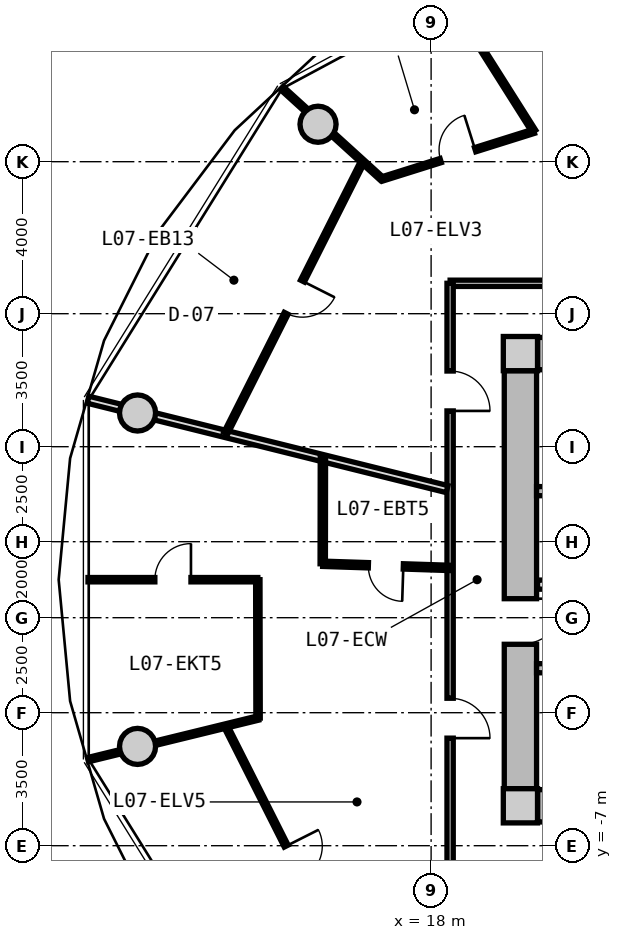
"""IFC4 building model, lengths in metres.
Left out: names, types, materials, properties, quantities, classifications, styles, units other than length and angle.
Written with IfcOpenShell. Run it as: python <this file> out.ifc"""

import sys

from ifc_helpers import new_model, si_unit, direction, frame, frame_2d, origin, origin_2d, place, context, subcontext, project, spatial, rectangle, circle, extrude, source, transform, mapped, element, fill, save


model = new_model("IFC4")
c1 = context("Model", 3, precision=1e-05, world=origin(), true_north=direction((0.0, 1.0)))
c2 = subcontext(c1, "Body", "Model", "MODEL_VIEW")
j1 = project(units=[si_unit("LENGTHUNIT", "METRE"), si_unit("PLANEANGLEUNIT", "RADIAN")], contexts=[c1])
p1 = place(None, origin())
s1 = spatial("IfcSite", under=j1, at=p1, CompositionType="ELEMENT")
p2 = place(p1, origin())
s2 = spatial("IfcBuilding", under=s1, at=p2, CompositionType="ELEMENT")
p3 = place(p2, frame((0.0, 0.0, 27.7)))
s3 = spatial("IfcBuildingStorey", under=s2, at=p3, CompositionType="ELEMENT", Elevation=27.7)
m1 = source(origin(), c2, "Body", "SweptSolid", [
    extrude(rectangle(XDim=0.9, YDim=0.9, at=origin_2d()), origin(), (0.0, 0.0, 1.0), 3.05),
])
for number, where, z_axis, x_axis in (
    (1, (20.35, -5.95, 0.0), (0.0, 0.0, 1.0), (1.0, 0.0, 0.0)),
    (2, (20.35, 5.95, 0.0), (0.0, 0.0, 1.0), (1.0, 0.0, 0.0)),
):
    element("IfcColumn", number, at=place(p3, frame(where, z_axis=z_axis, x_axis=x_axis)), inside=s3, PredefinedType="COLUMN", context=c2, shape_type="MappedRepresentation", body=[
        mapped(m1, transform((0.0, 0.0, 0.0), x_axis=(1.0, 0.0, 0.0), y_axis=(0.0, 1.0, 0.0), z_axis=(0.0, 0.0, 1.0), scale=1.0)),
    ])
m2 = source(origin(), c2, "Body", "SweptSolid", [
    extrude(rectangle(XDim=14.4, YDim=0.85, at=frame_2d((7.2, 0.0))), origin(), (0.0, 0.0, 1.0), 2.79),
])
for number, where, z_axis, x_axis in (
    (3, (20.8, 5.95, 0.0), (0.0, 0.0, 1.0), (1.0, 0.0, 0.0)),
    (4, (35.2, -5.95, 0.0), (0.0, 0.0, 1.0), (-1.0, 0.0, 0.0)),
):
    element("IfcWall", number, at=place(p3, frame(where, z_axis=z_axis, x_axis=x_axis)), inside=s3, PredefinedType="SHEAR", context=c2, shape_type="MappedRepresentation", body=[
        mapped(m2, transform((0.0, 0.0, 0.0), x_axis=(1.0, 0.0, 0.0), y_axis=(0.0, 1.0, 0.0), z_axis=(0.0, 0.0, 1.0), scale=1.0)),
    ])
m3 = source(origin(), c2, "Body", "SweptSolid", [
    extrude(rectangle(XDim=11.0, YDim=0.85, at=frame_2d((5.5, 0.0))), origin(), (0.0, 0.0, 1.0), 2.79),
])
p4 = place(p3, frame((20.35, -5.5, 0.0), z_axis=(0.0, 0.0, 1.0), x_axis=(0.0, 1.0, 0.0)))
e5 = element("IfcWall", 5, at=p4, inside=s3, PredefinedType="SHEAR", context=c2, shape_type="MappedRepresentation", body=[
    mapped(m3, transform((0.0, 0.0, 0.0), x_axis=(1.0, 0.0, 0.0), y_axis=(0.0, 1.0, 0.0), z_axis=(0.0, 0.0, 1.0), scale=1.0)),
])
p5 = place(p4, frame((3.8, 0.0, 0.0)))
e6 = element("IfcOpeningElement", 6, at=p5, cuts=e5, PredefinedType="OPENING", context=c2, shape_type="SweptSolid", body=[
    extrude(rectangle(XDim=1.2, YDim=2.15, at=frame_2d((0.6, 1.075))), frame((0.0, 0.435, 0.0), z_axis=(0.0, -1.0, 0.0), x_axis=(1.0, 0.0, 0.0)), (0.0, 0.0, 1.0), 0.87),
])
m4 = source(origin(), c2, "Body", "SweptSolid", [
    extrude(circle(Radius=0.475, at=origin_2d()), origin(), (0.0, 0.0, 1.0), 3.05),
])
for number, where, z_axis, x_axis in (
    (7, (15.025, 11.985, 0.0), (0.0, 0.0, 1.0), (1.0, 0.0, 0.0)),
    (8, (10.275, 4.387, 0.0), (0.0, 0.0, 1.0), (1.0, 0.0, 0.0)),
    (9, (10.275, -4.387, 0.0), (0.0, 0.0, 1.0), (1.0, 0.0, 0.0)),
):
    element("IfcColumn", number, at=place(p3, frame(where, z_axis=z_axis, x_axis=x_axis)), inside=s3, PredefinedType="COLUMN", context=c2, shape_type="MappedRepresentation", body=[
        mapped(m4, transform((0.0, 0.0, 0.0), x_axis=(1.0, 0.0, 0.0), y_axis=(0.0, 1.0, 0.0), z_axis=(0.0, 0.0, 1.0), scale=1.0)),
    ])
m5 = source(origin(), c2, "Body", "SweptSolid", [
    extrude(rectangle(XDim=7.765, YDim=0.24, at=frame_2d((3.883, 0.0))), origin(), (0.0, 0.0, 1.0), 2.79),
])
p6 = place(p3, frame((20.775, 2.33, 0.0), z_axis=(0.0, 0.0, 1.0), x_axis=(1.0, 0.0, 0.0)))
e10 = element("IfcWall", 10, at=p6, inside=s3, PredefinedType="PARTITIONING", context=c2, shape_type="MappedRepresentation", body=[
    mapped(m5, transform((0.0, 0.0, 0.0), x_axis=(1.0, 0.0, 0.0), y_axis=(0.0, 1.0, 0.0), z_axis=(0.0, 0.0, 1.0), scale=1.0)),
])
p7 = place(p3, frame((20.775, -2.33, 0.0), z_axis=(0.0, 0.0, 1.0), x_axis=(1.0, 0.0, 0.0)))
e11 = element("IfcWall", 11, at=p7, inside=s3, PredefinedType="PARTITIONING", context=c2, shape_type="MappedRepresentation", body=[
    mapped(m5, transform((0.0, 0.0, 0.0), x_axis=(1.0, 0.0, 0.0), y_axis=(0.0, 1.0, 0.0), z_axis=(0.0, 0.0, 1.0), scale=1.0)),
])
p8 = place(p7, frame((0.885, 0.0, 0.0)))
e12 = element("IfcOpeningElement", 12, at=p8, cuts=e11, PredefinedType="OPENING", context=c2, shape_type="SweptSolid", body=[
    extrude(rectangle(XDim=1.1, YDim=2.15, at=frame_2d((0.55, 1.075))), frame((0.0, 0.13, 0.0), z_axis=(0.0, -1.0, 0.0), x_axis=(1.0, 0.0, 0.0)), (0.0, 0.0, 1.0), 0.26),
])
m6 = source(origin(), c2, "Body", "SweptSolid", [
    extrude(rectangle(XDim=7.62, YDim=0.24, at=frame_2d((3.81, 0.0))), origin(), (0.0, 0.0, 1.0), 2.775),
])
p9 = place(p3, frame((20.8, -0.13, 0.0), z_axis=(0.0, 0.0, 1.0), x_axis=(1.0, 0.0, 0.0)))
e13 = element("IfcWall", 13, at=p9, inside=s3, PredefinedType="PARTITIONING", context=c2, shape_type="MappedRepresentation", body=[
    mapped(m6, transform((0.0, 0.0, 0.0), x_axis=(1.0, 0.0, 0.0), y_axis=(0.0, 1.0, 0.0), z_axis=(0.0, 0.0, 1.0), scale=1.0)),
])
p10 = place(p9, frame((6.22, 0.0, 0.0)))
e14 = element("IfcOpeningElement", 14, at=p10, cuts=e13, PredefinedType="OPENING", context=c2, shape_type="SweptSolid", body=[
    extrude(rectangle(XDim=1.0, YDim=2.1, at=frame_2d((0.5, 1.05))), frame((0.0, 0.13, 0.0), z_axis=(0.0, -1.0, 0.0), x_axis=(1.0, 0.0, 0.0)), (0.0, 0.0, 1.0), 0.26),
])
p11 = place(p9, frame((0.85, 0.0, 0.0)))
e15 = element("IfcOpeningElement", 15, at=p11, cuts=e13, PredefinedType="OPENING", context=c2, shape_type="SweptSolid", body=[
    extrude(rectangle(XDim=1.1, YDim=2.2, at=frame_2d((0.55, 1.1))), frame((0.0, 0.13, 0.0), z_axis=(0.0, -1.0, 0.0), x_axis=(1.0, 0.0, 0.0)), (0.0, 0.0, 1.0), 0.26),
])
p12 = place(p9, frame((3.85, 0.0, 0.0)))
e16 = element("IfcOpeningElement", 16, at=p12, cuts=e13, PredefinedType="OPENING", context=c2, shape_type="SweptSolid", body=[
    extrude(rectangle(XDim=1.1, YDim=2.2, at=frame_2d((0.55, 1.1))), frame((0.0, 0.13, 0.0), z_axis=(0.0, -1.0, 0.0), x_axis=(1.0, 0.0, 0.0)), (0.0, 0.0, 1.0), 0.26),
])
m7 = source(origin(), c2, "Body", "SweptSolid", [
    extrude(rectangle(XDim=19.0, YDim=0.165, at=frame_2d((9.5, 0.0))), origin(), (0.0, 0.0, 1.0), 2.775),
])
p13 = place(p3, frame((18.5, 7.8, 0.0), z_axis=(0.0, 0.0, 1.0), x_axis=(1.0, 0.0, 0.0)))
e17 = element("IfcWall", 17, at=p13, inside=s3, PredefinedType="PARTITIONING", context=c2, shape_type="MappedRepresentation", body=[
    mapped(m7, transform((0.0, 0.0, 0.0), x_axis=(1.0, 0.0, 0.0), y_axis=(0.0, 1.0, 0.0), z_axis=(0.0, 0.0, 1.0), scale=1.0)),
])
p14 = place(p13, frame((10.448, 0.0, 0.0)))
e18 = element("IfcOpeningElement", 18, at=p14, cuts=e17, PredefinedType="OPENING", context=c2, shape_type="SweptSolid", body=[
    extrude(rectangle(XDim=1.05, YDim=2.15, at=frame_2d((0.525, 1.075))), frame((0.0, 0.093, 0.0), z_axis=(0.0, -1.0, 0.0), x_axis=(1.0, 0.0, 0.0)), (0.0, 0.0, 1.0), 0.185),
])
m8 = source(origin(), c2, "Body", "SweptSolid", [
    extrude(rectangle(XDim=15.6, YDim=0.165, at=frame_2d((7.8, 0.0))), origin(), (0.0, 0.0, 1.0), 2.775),
])
p15 = place(p3, frame((18.5, -7.8, 0.0), z_axis=(0.0, 0.0, 1.0), x_axis=(0.0, 1.0, 0.0)))
e19 = element("IfcWall", 19, at=p15, inside=s3, PredefinedType="PARTITIONING", context=c2, shape_type="MappedRepresentation", body=[
    mapped(m8, transform((0.0, 0.0, 0.0), x_axis=(1.0, 0.0, 0.0), y_axis=(0.0, 1.0, 0.0), z_axis=(0.0, 0.0, 1.0), scale=1.0)),
])
p16 = place(p15, frame((12.241, 0.0, 0.0)))
e20 = element("IfcOpeningElement", 20, at=p16, cuts=e19, PredefinedType="OPENING", context=c2, shape_type="SweptSolid", body=[
    extrude(rectangle(XDim=1.05, YDim=2.15, at=frame_2d((0.525, 1.075))), frame((0.0, 0.093, 0.0), z_axis=(0.0, -1.0, 0.0), x_axis=(1.0, 0.0, 0.0)), (0.0, 0.0, 1.0), 0.185),
])
p17 = place(p15, frame((3.63, 0.0, 0.0)))
e21 = element("IfcOpeningElement", 21, at=p17, cuts=e19, PredefinedType="OPENING", context=c2, shape_type="SweptSolid", body=[
    extrude(rectangle(XDim=1.05, YDim=2.15, at=frame_2d((0.525, 1.075))), frame((0.0, 0.093, 0.0), z_axis=(0.0, -1.0, 0.0), x_axis=(1.0, 0.0, 0.0)), (0.0, 0.0, 1.0), 0.185),
])
m9 = source(origin(), c2, "Body", "SweptSolid", [
    extrude(rectangle(XDim=9.737, YDim=0.19, at=frame_2d((4.869, 0.0))), origin(), (0.0, 0.0, 1.0), 2.225),
])
p18 = place(p3, frame((18.42, 2.385, 0.0), z_axis=(0.0, 0.0, 1.0), x_axis=(-0.970392716238, 0.241532557375, 0.0)))
e22 = element("IfcWall", 22, at=p18, inside=s3, PredefinedType="PARTITIONING", context=c2, shape_type="MappedRepresentation", body=[
    mapped(m9, transform((0.0, 0.0, 0.0), x_axis=(1.0, 0.0, 0.0), y_axis=(0.0, 1.0, 0.0), z_axis=(0.0, 0.0, 1.0), scale=1.0)),
])
m10 = source(origin(), c2, "Body", "SweptSolid", [
    extrude(rectangle(XDim=8.018, YDim=0.115, at=frame_2d((4.009, 0.0))), origin(), (0.0, 0.0, 1.0), 2.775),
])
p19 = place(p3, frame((16.205, 11.014, 0.0), z_axis=(0.0, 0.0, 1.0), x_axis=(-0.450134355233, -0.89296084026, 0.0)))
e23 = element("IfcWall", 23, at=p19, inside=s3, PredefinedType="PARTITIONING", context=c2, shape_type="MappedRepresentation", body=[
    mapped(m10, transform((0.0, 0.0, 0.0), x_axis=(1.0, 0.0, 0.0), y_axis=(0.0, 1.0, 0.0), z_axis=(0.0, 0.0, 1.0), scale=1.0)),
])
p20 = place(p19, frame((3.534, 0.0, 0.0)))
e24 = element("IfcOpeningElement", 24, at=p20, cuts=e23, PredefinedType="OPENING", context=c2, shape_type="SweptSolid", body=[
    extrude(rectangle(XDim=0.95, YDim=2.1, at=frame_2d((0.475, 1.05))), frame((0.0, 0.067, 0.0), z_axis=(0.0, -1.0, 0.0), x_axis=(1.0, 0.0, 0.0)), (0.0, 0.0, 1.0), 0.135),
])
m11 = source(origin(), c2, "Body", "SweptSolid", [
    extrude(rectangle(XDim=3.551, YDim=0.115, at=frame_2d((1.775, 0.0))), origin(), (0.0, 0.0, 1.0), 2.225),
])
p21 = place(p3, frame((16.698, 10.553, 0.0), z_axis=(0.0, 0.0, 1.0), x_axis=(-0.740291560769, 0.672285954824, 0.0)))
e25 = element("IfcWall", 25, at=p21, inside=s3, PredefinedType="PARTITIONING", context=c2, shape_type="MappedRepresentation", body=[
    mapped(m11, transform((0.0, 0.0, 0.0), x_axis=(1.0, 0.0, 0.0), y_axis=(0.0, 1.0, 0.0), z_axis=(0.0, 0.0, 1.0), scale=1.0)),
])
m12 = source(origin(), c2, "Body", "SweptSolid", [
    extrude(rectangle(XDim=4.15, YDim=0.115, at=frame_2d((2.075, 0.0))), origin(), (0.0, 0.0, 1.0), 2.775),
])
p22 = place(p3, frame((20.704, 11.801, 0.0), z_axis=(0.0, 0.0, 1.0), x_axis=(-0.534475378192, 0.845184045109, 0.0)))
e26 = element("IfcWall", 26, at=p22, inside=s3, PredefinedType="PARTITIONING", context=c2, shape_type="MappedRepresentation", body=[
    mapped(m12, transform((0.0, 0.0, 0.0), x_axis=(1.0, 0.0, 0.0), y_axis=(0.0, 1.0, 0.0), z_axis=(0.0, 0.0, 1.0), scale=1.0)),
])
m13 = source(origin(), c2, "Body", "SweptSolid", [
    extrude(rectangle(XDim=4.189, YDim=0.115, at=frame_2d((2.094, 0.0))), origin(), (0.0, 0.0, 1.0), 2.775),
])
p23 = place(p3, frame((20.704, 11.801, 0.0), z_axis=(0.0, 0.0, 1.0), x_axis=(-0.954002766053, -0.299797802467, 0.0)))
e27 = element("IfcWall", 27, at=p23, inside=s3, PredefinedType="PARTITIONING", context=c2, shape_type="MappedRepresentation", body=[
    mapped(m13, transform((0.0, 0.0, 0.0), x_axis=(1.0, 0.0, 0.0), y_axis=(0.0, 1.0, 0.0), z_axis=(0.0, 0.0, 1.0), scale=1.0)),
])
p24 = place(p23, frame((1.619, 0.0, 0.0)))
e28 = element("IfcOpeningElement", 28, at=p24, cuts=e27, PredefinedType="OPENING", context=c2, shape_type="SweptSolid", body=[
    extrude(rectangle(XDim=0.95, YDim=2.1, at=frame_2d((0.475, 1.05))), frame((0.0, 0.067, 0.0), z_axis=(0.0, -1.0, 0.0), x_axis=(1.0, 0.0, 0.0)), (0.0, 0.0, 1.0), 0.135),
])
p25 = place(p3, frame((12.596, -3.854, 0.0), z_axis=(0.0, 0.0, 1.0), x_axis=(0.450134355233, -0.89296084026, 0.0)))
e29 = element("IfcWall", 29, at=p25, inside=s3, PredefinedType="PARTITIONING", context=c2, shape_type="MappedRepresentation", body=[
    mapped(m10, transform((0.0, 0.0, 0.0), x_axis=(1.0, 0.0, 0.0), y_axis=(0.0, 1.0, 0.0), z_axis=(0.0, 0.0, 1.0), scale=1.0)),
])
p26 = place(p25, frame((3.534, 0.0, 0.0)))
e30 = element("IfcOpeningElement", 30, at=p26, cuts=e29, PredefinedType="OPENING", context=c2, shape_type="SweptSolid", body=[
    extrude(rectangle(XDim=0.95, YDim=2.1, at=frame_2d((0.475, 1.05))), frame((0.0, 0.067, 0.0), z_axis=(0.0, -1.0, 0.0), x_axis=(1.0, 0.0, 0.0)), (0.0, 0.0, 1.0), 0.135),
])
m14 = source(origin(), c2, "Body", "SweptSolid", [
    extrude(rectangle(XDim=4.609, YDim=0.115, at=frame_2d((2.305, 0.0))), origin(), (0.0, 0.0, 1.0), 2.225),
])
p27 = place(p3, frame((13.448, -3.641, 0.0), z_axis=(0.0, 0.0, 1.0), x_axis=(-0.971345494518, -0.237671896276, 0.0)))
e31 = element("IfcWall", 31, at=p27, inside=s3, PredefinedType="PARTITIONING", context=c2, shape_type="MappedRepresentation", body=[
    mapped(m14, transform((0.0, 0.0, 0.0), x_axis=(1.0, 0.0, 0.0), y_axis=(0.0, 1.0, 0.0), z_axis=(0.0, 0.0, 1.0), scale=1.0)),
])
m15 = source(origin(), c2, "Body", "SweptSolid", [
    extrude(rectangle(XDim=3.323, YDim=0.14, at=frame_2d((1.662, 0.0))), origin(), (0.0, 0.0, 1.0), 2.775),
])
p28 = place(p3, frame((18.47, 0.311, 0.0), z_axis=(0.0, 0.0, 1.0), x_axis=(-0.999467979553, 0.032615300817, 0.0)))
e32 = element("IfcWall", 32, at=p28, inside=s3, PredefinedType="PARTITIONING", context=c2, shape_type="MappedRepresentation", body=[
    mapped(m15, transform((0.0, 0.0, 0.0), x_axis=(1.0, 0.0, 0.0), y_axis=(0.0, 1.0, 0.0), z_axis=(0.0, 0.0, 1.0), scale=1.0)),
])
p29 = place(p28, frame((1.202, 0.0, 0.0)))
e33 = element("IfcOpeningElement", 33, at=p29, cuts=e32, PredefinedType="OPENING", context=c2, shape_type="SweptSolid", body=[
    extrude(rectangle(XDim=0.92, YDim=2.1, at=frame_2d((0.46, 1.05))), frame((0.0, 0.08, 0.0), z_axis=(0.0, -1.0, 0.0), x_axis=(1.0, 0.0, 0.0)), (0.0, 0.0, 1.0), 0.16),
])
m16 = source(origin(), c2, "Body", "SweptSolid", [
    extrude(rectangle(XDim=2.795, YDim=0.14, at=frame_2d((1.397, 0.0))), origin(), (0.0, 0.0, 1.0), 2.775),
])
p30 = place(p3, frame((15.148, 0.419, 0.0), z_axis=(0.0, 0.0, 1.0), x_axis=(0.001659531299, 0.999998622977, 0.0)))
e34 = element("IfcWall", 34, at=p30, inside=s3, PredefinedType="PARTITIONING", context=c2, shape_type="MappedRepresentation", body=[
    mapped(m16, transform((0.0, 0.0, 0.0), x_axis=(1.0, 0.0, 0.0), y_axis=(0.0, 1.0, 0.0), z_axis=(0.0, 0.0, 1.0), scale=1.0)),
])
m17 = source(origin(), c2, "Body", "SweptSolid", [
    extrude(rectangle(XDim=4.469, YDim=0.115, at=frame_2d((2.234, 0.0))), origin(), (0.0, 0.0, 1.0), 2.775),
])
p31 = place(p3, frame((13.44, 0.0, 0.0), z_axis=(0.0, 0.0, 1.0), x_axis=(-1.0, 0.0, 0.0)))
e35 = element("IfcWall", 35, at=p31, inside=s3, PredefinedType="PARTITIONING", context=c2, shape_type="MappedRepresentation", body=[
    mapped(m17, transform((0.0, 0.0, 0.0), x_axis=(1.0, 0.0, 0.0), y_axis=(0.0, 1.0, 0.0), z_axis=(0.0, 0.0, 1.0), scale=1.0)),
])
p32 = place(p31, frame((1.759, 0.0, 0.0)))
e36 = element("IfcOpeningElement", 36, at=p32, cuts=e35, PredefinedType="OPENING", context=c2, shape_type="SweptSolid", body=[
    extrude(rectangle(XDim=0.95, YDim=2.1, at=frame_2d((0.475, 1.05))), frame((0.0, 0.067, 0.0), z_axis=(0.0, -1.0, 0.0), x_axis=(1.0, 0.0, 0.0)), (0.0, 0.0, 1.0), 0.135),
])
m18 = source(origin(), c2, "Body", "SweptSolid", [
    extrude(rectangle(XDim=3.641, YDim=0.115, at=frame_2d((1.821, 0.0))), origin(), (0.0, 0.0, 1.0), 2.775),
])
p33 = place(p3, frame((13.44, 0.0, 0.0), z_axis=(0.0, 0.0, 1.0), x_axis=(0.001877301419, -0.999998237868, 0.0)))
e37 = element("IfcWall", 37, at=p33, inside=s3, PredefinedType="PARTITIONING", context=c2, shape_type="MappedRepresentation", body=[
    mapped(m18, transform((0.0, 0.0, 0.0), x_axis=(1.0, 0.0, 0.0), y_axis=(0.0, 1.0, 0.0), z_axis=(0.0, 0.0, 1.0), scale=1.0)),
])
m19 = source(origin(), c2, "Body", "SweptSolid", [
    extrude(rectangle(XDim=1.2, YDim=2.15, at=frame_2d((0.6, 1.075))), frame((0.0, 0.025, 0.0), z_axis=(0.0, -1.0, 0.0), x_axis=(1.0, 0.0, 0.0)), (0.0, 0.0, 1.0), 0.05),
])
p34 = place(p5, frame((1.2, 0.0, 0.0), z_axis=(0.0, 0.0, 1.0), x_axis=(-1.0, 0.0, 0.0)))
e38 = element("IfcDoor", 38, at=p34, inside=s3, OperationType="SINGLE_SWING_LEFT", PredefinedType="DOOR", context=c2, shape_type="MappedRepresentation", body=[
    mapped(m19, transform((0.0, 0.0, 0.0), x_axis=(1.0, 0.0, 0.0), y_axis=(0.0, 1.0, 0.0), z_axis=(0.0, 0.0, 1.0), scale=1.0)),
])
fill(e6, e38)
m20 = source(origin(), c2, "Body", "SweptSolid", [
    extrude(rectangle(XDim=1.05, YDim=2.15, at=frame_2d((0.525, 1.075))), frame((0.0, 0.025, 0.0), z_axis=(0.0, -1.0, 0.0), x_axis=(1.0, 0.0, 0.0)), (0.0, 0.0, 1.0), 0.05),
])
p35 = place(p16, frame((1.05, 0.0, 0.0), z_axis=(0.0, 0.0, 1.0), x_axis=(-1.0, 0.0, 0.0)))
e39 = element("IfcDoor", 39, at=p35, inside=s3, OperationType="SINGLE_SWING_RIGHT", PredefinedType="DOOR", context=c2, shape_type="MappedRepresentation", body=[
    mapped(m20, transform((0.0, 0.0, 0.0), x_axis=(1.0, 0.0, 0.0), y_axis=(0.0, 1.0, 0.0), z_axis=(0.0, 0.0, 1.0), scale=1.0)),
])
fill(e20, e39)
m21 = source(origin(), c2, "Body", "SweptSolid", [
    extrude(rectangle(XDim=0.95, YDim=2.1, at=frame_2d((0.475, 1.05))), frame((0.0, 0.025, 0.0), z_axis=(0.0, -1.0, 0.0), x_axis=(1.0, 0.0, 0.0)), (0.0, 0.0, 1.0), 0.05),
])
p36 = place(p24, frame((0.95, 0.0, 0.0), z_axis=(0.0, 0.0, 1.0), x_axis=(-1.0, 0.0, 0.0)))
e40 = element("IfcDoor", 40, at=p36, inside=s3, OperationType="SINGLE_SWING_RIGHT", PredefinedType="DOOR", context=c2, shape_type="MappedRepresentation", body=[
    mapped(m21, transform((0.0, 0.0, 0.0), x_axis=(1.0, 0.0, 0.0), y_axis=(0.0, 1.0, 0.0), z_axis=(0.0, 0.0, 1.0), scale=1.0)),
])
fill(e28, e40)
p37 = place(p20, origin())
e41 = element("IfcDoor", 41, at=p37, inside=s3, OperationType="SINGLE_SWING_LEFT", PredefinedType="DOOR", context=c2, shape_type="MappedRepresentation", body=[
    mapped(m21, transform((0.0, 0.0, 0.0), x_axis=(1.0, 0.0, 0.0), y_axis=(0.0, 1.0, 0.0), z_axis=(0.0, 0.0, 1.0), scale=1.0)),
])
fill(e24, e41)
p38 = place(p17, frame((1.05, 0.0, 0.0), z_axis=(0.0, 0.0, 1.0), x_axis=(-1.0, 0.0, 0.0)))
e42 = element("IfcDoor", 42, at=p38, inside=s3, OperationType="SINGLE_SWING_RIGHT", PredefinedType="DOOR", context=c2, shape_type="MappedRepresentation", body=[
    mapped(m20, transform((0.0, 0.0, 0.0), x_axis=(1.0, 0.0, 0.0), y_axis=(0.0, 1.0, 0.0), z_axis=(0.0, 0.0, 1.0), scale=1.0)),
])
fill(e21, e42)
m22 = source(origin(), c2, "Body", "SweptSolid", [
    extrude(rectangle(XDim=0.92, YDim=2.1, at=frame_2d((0.46, 1.05))), frame((0.0, 0.025, 0.0), z_axis=(0.0, -1.0, 0.0), x_axis=(1.0, 0.0, 0.0)), (0.0, 0.0, 1.0), 0.05),
])
p39 = place(p29, origin())
e43 = element("IfcDoor", 43, at=p39, inside=s3, OperationType="SINGLE_SWING_LEFT", PredefinedType="DOOR", context=c2, shape_type="MappedRepresentation", body=[
    mapped(m22, transform((0.0, 0.0, 0.0), x_axis=(1.0, 0.0, 0.0), y_axis=(0.0, 1.0, 0.0), z_axis=(0.0, 0.0, 1.0), scale=1.0)),
])
fill(e33, e43)
p40 = place(p32, frame((0.95, 0.0, 0.0), z_axis=(0.0, 0.0, 1.0), x_axis=(-1.0, 0.0, 0.0)))
e44 = element("IfcDoor", 44, at=p40, inside=s3, OperationType="SINGLE_SWING_RIGHT", PredefinedType="DOOR", context=c2, shape_type="MappedRepresentation", body=[
    mapped(m21, transform((0.0, 0.0, 0.0), x_axis=(1.0, 0.0, 0.0), y_axis=(0.0, 1.0, 0.0), z_axis=(0.0, 0.0, 1.0), scale=1.0)),
])
fill(e36, e44)
p41 = place(p26, origin())
e45 = element("IfcDoor", 45, at=p41, inside=s3, OperationType="SINGLE_SWING_LEFT", PredefinedType="DOOR", context=c2, shape_type="MappedRepresentation", body=[
    mapped(m21, transform((0.0, 0.0, 0.0), x_axis=(1.0, 0.0, 0.0), y_axis=(0.0, 1.0, 0.0), z_axis=(0.0, 0.0, 1.0), scale=1.0)),
])
fill(e30, e45)
save(model, sys.argv[1])
